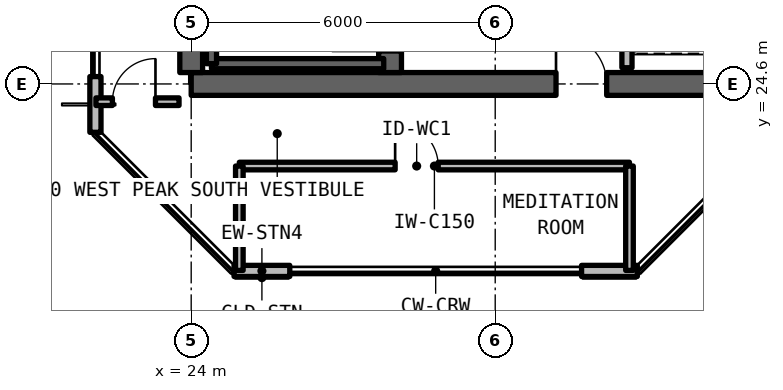
"""IFC4 building model, lengths in metres.
Left out: names, types, materials, properties, quantities, classifications, styles, units other than length and angle.
Written with IfcOpenShell. Run it as: python <this file> out.ifc"""

import sys

from ifc_helpers import new_model, si_unit, direction, frame, frame_2d, origin, place, context, subcontext, project, spatial, rectangle, extrude, element, fill, save


model = new_model("IFC4")
c1 = context("Model", 3, precision=1e-05, world=origin(), true_north=direction((0.0, 1.0)))
c2 = subcontext(c1, "Body", "Model", "MODEL_VIEW")
j1 = project(units=[si_unit("LENGTHUNIT", "METRE"), si_unit("PLANEANGLEUNIT", "RADIAN")], contexts=[c1])
p1 = place(None, origin())
s1 = spatial("IfcSite", under=j1, at=p1, CompositionType="ELEMENT")
p2 = place(p1, origin())
s2 = spatial("IfcBuilding", under=s1, at=p2, CompositionType="ELEMENT")
p3 = place(p2, frame((0.0, 0.0, 249.81)))
s3 = spatial("IfcBuildingStorey", under=s2, at=p3, CompositionType="ELEMENT", Elevation=249.81)
p4 = place(p3, frame((24.0, 24.6, 0.0), z_axis=(0.0, 0.0, 1.0), x_axis=(1.0, 0.0, 0.0)))
e1 = element("IfcWall", 1, at=p4, inside=s3, PredefinedType="SHEAR", context=c2, shape_type="SweptSolid", body=[
    extrude(rectangle(XDim=12.0, YDim=0.45, at=frame_2d((6.0, 0.0))), origin(), (0.0, 0.0, 1.0), 3.63),
])
p5 = place(p4, frame((7.2, 0.0, 0.0)))
e2 = element("IfcOpeningElement", 2, at=p5, cuts=e1, PredefinedType="OPENING", context=c2, shape_type="SweptSolid", body=[
    extrude(rectangle(XDim=1.0, YDim=2.15, at=frame_2d((0.5, 1.075))), frame((0.0, 0.235, 0.0), z_axis=(0.0, -1.0, 0.0), x_axis=(1.0, 0.0, 0.0)), (0.0, 0.0, 1.0), 0.47),
])
p6 = place(p3, frame((24.0, 24.825, 0.0), z_axis=(0.0, 0.0, 1.0), x_axis=(0.0, 1.0, 0.0)))
e3 = element("IfcWall", 3, at=p6, inside=s3, PredefinedType="SHEAR", context=c2, shape_type="SweptSolid", body=[
    extrude(rectangle(XDim=17.55, YDim=0.45, at=frame_2d((8.775, 0.0))), origin(), (0.0, 0.0, 1.0), 3.63),
])
p7 = place(p3, frame((27.925, 24.825, 0.0), z_axis=(0.0, 0.0, 1.0), x_axis=(0.0, 1.0, 0.0)))
e4 = element("IfcWall", 4, at=p7, inside=s3, PredefinedType="SHEAR", context=c2, shape_type="SweptSolid", body=[
    extrude(rectangle(XDim=17.55, YDim=0.45, at=frame_2d((8.775, 0.0))), origin(), (0.0, 0.0, 1.0), 3.63),
])
p8 = place(p7, frame((0.425, 0.0, 0.0)))
e5 = element("IfcOpeningElement", 5, at=p8, cuts=e4, PredefinedType="OPENING", context=c2, shape_type="SweptSolid", body=[
    extrude(rectangle(XDim=1.15, YDim=2.15, at=frame_2d((0.575, 1.075))), frame((0.0, 0.235, 0.0), z_axis=(0.0, -1.0, 0.0), x_axis=(1.0, 0.0, 0.0)), (0.0, 0.0, 1.0), 0.47),
])
p9 = place(p7, frame((9.625, 0.0, 0.0)))
e6 = element("IfcOpeningElement", 6, at=p9, cuts=e4, PredefinedType="OPENING", context=c2, shape_type="SweptSolid", body=[
    extrude(rectangle(XDim=1.15, YDim=2.15, at=frame_2d((0.575, 1.075))), frame((0.0, 0.235, 0.0), z_axis=(0.0, -1.0, 0.0), x_axis=(1.0, 0.0, 0.0)), (0.0, 0.0, 1.0), 0.47),
])
p10 = place(p3, frame((24.846, 20.91, 0.0), z_axis=(0.0, 0.0, 1.0), x_axis=(1.0, 0.0, 0.0)))
e7 = element("IfcWall", 7, at=p10, inside=s3, PredefinedType="SOLIDWALL", context=c2, shape_type="SweptSolid", body=[
    extrude(rectangle(XDim=1.1, YDim=0.22, at=frame_2d((0.55, 0.0))), origin(), (0.0, 0.0, 1.0), 3.41),
])
for number, where, z_axis, x_axis in (
    (8, (31.704, 20.91, 0.0), (0.0, 0.0, 1.0), (1.0, 0.0, 0.0)),
    (9, (22.11, 24.746, 0.0), (0.0, 0.0, 1.0), (0.0, -1.0, 0.0)),
):
    element("IfcWall", number, at=place(p3, frame(where, z_axis=z_axis, x_axis=x_axis)), inside=s3, PredefinedType="SOLIDWALL", context=c2, shape_type="SweptSolid", body=[
        extrude(rectangle(XDim=1.1, YDim=0.22, at=frame_2d((0.55, 0.0))), origin(), (0.0, 0.0, 1.0), 3.41),
    ])
p11 = place(p3, frame((32.6, 24.92, 0.0), z_axis=(0.0, 0.0, 1.0), x_axis=(0.0, 1.0, 0.0)))
e10 = element("IfcWall", 10, at=p11, inside=s3, PredefinedType="SOLIDWALL", context=c2, shape_type="SweptSolid", body=[
    extrude(rectangle(XDim=3.58, YDim=0.2, at=frame_2d((1.79, 0.0))), origin(), (0.0, 0.0, 1.0), 2.63),
])
p12 = place(p11, frame((1.3, 0.0, 0.0)))
e11 = element("IfcOpeningElement", 11, at=p12, cuts=e10, PredefinedType="OPENING", context=c2, shape_type="SweptSolid", body=[
    extrude(rectangle(XDim=1.1, YDim=2.2, at=frame_2d((0.55, 1.1))), frame((0.0, 0.11, 0.0), z_axis=(0.0, -1.0, 0.0), x_axis=(1.0, 0.0, 0.0)), (0.0, 0.0, 1.0), 0.22),
])
p13 = place(p3, frame((24.95, 22.98, 0.0), z_axis=(0.0, 0.0, 1.0), x_axis=(1.0, 0.0, 0.0)))
e12 = element("IfcWall", 12, at=p13, inside=s3, PredefinedType="SOLIDWALL", context=c2, shape_type="SweptSolid", body=[
    extrude(rectangle(XDim=7.7, YDim=0.15, at=frame_2d((3.85, 0.0))), origin(), (0.0, 0.0, 1.0), 2.63),
])
p14 = place(p13, frame((3.075, 0.0, 0.0)))
e13 = element("IfcOpeningElement", 13, at=p14, cuts=e12, PredefinedType="OPENING", context=c2, shape_type="SweptSolid", body=[
    extrude(rectangle(XDim=0.85, YDim=2.1, at=frame_2d((0.425, 1.05))), frame((0.0, 0.085, 0.0), z_axis=(0.0, -1.0, 0.0), x_axis=(1.0, 0.0, 0.0)), (0.0, 0.0, 1.0), 0.17),
])
for number, where, z_axis, x_axis in (
    (14, (24.95, 20.92, 0.0), (0.0, 0.0, 1.0), (0.0, 1.0, 0.0)),
    (15, (32.65, 20.92, 0.0), (0.0, 0.0, 1.0), (0.0, 1.0, 0.0)),
):
    element("IfcWall", number, at=place(p3, frame(where, z_axis=z_axis, x_axis=x_axis)), inside=s3, PredefinedType="SOLIDWALL", context=c2, shape_type="SweptSolid", body=[
        extrude(rectangle(XDim=2.06, YDim=0.15, at=frame_2d((1.03, 0.0))), origin(), (0.0, 0.0, 1.0), 2.63),
    ])
p15 = place(p3, frame((22.12, 24.25, 0.0), z_axis=(0.0, 0.0, 1.0), x_axis=(1.0, 0.0, 0.0)))
e16 = element("IfcWall", 16, at=p15, inside=s3, PredefinedType="SOLIDWALL", context=c2, shape_type="SweptSolid", body=[
    extrude(rectangle(XDim=1.64, YDim=0.15, at=frame_2d((0.82, 0.0))), origin(), (0.0, 0.0, 1.0), 2.63),
])
p16 = place(p15, frame((0.325, 0.0, 0.0)))
e17 = element("IfcOpeningElement", 17, at=p16, cuts=e16, PredefinedType="OPENING", context=c2, shape_type="SweptSolid", body=[
    extrude(rectangle(XDim=0.85, YDim=2.1, at=frame_2d((0.425, 1.05))), frame((0.0, 0.085, 0.0), z_axis=(0.0, -1.0, 0.0), x_axis=(1.0, 0.0, 0.0)), (0.0, 0.0, 1.0), 0.17),
])
p17 = place(p3, frame((24.4, 25.0, 0.0), z_axis=(0.0, 0.0, 1.0), x_axis=(1.0, 0.0, 0.0)))
e18 = element("IfcWall", 18, at=p17, inside=s3, PredefinedType="SOLIDWALL", context=c2, shape_type="SweptSolid", body=[
    extrude(rectangle(XDim=3.4, YDim=0.2, at=frame_2d((1.7, 0.0))), origin(), (0.0, 0.0, 1.0), 3.63),
])
p18 = place(p3, frame((24.4, 33.0, 0.0), z_axis=(0.0, 0.0, 1.0), x_axis=(0.0, -1.0, 0.0)))
e19 = element("IfcWall", 19, at=p18, inside=s3, PredefinedType="SOLIDWALL", context=c2, shape_type="SweptSolid", body=[
    extrude(rectangle(XDim=8.0, YDim=0.2, at=frame_2d((4.0, 0.0))), origin(), (0.0, 0.0, 1.0), 3.63),
])
p19 = place(p14, origin())
e20 = element("IfcDoor", 20, at=p19, inside=s3, OperationType="SINGLE_SWING_LEFT", PredefinedType="DOOR", context=c2, shape_type="SweptSolid", body=[
    extrude(rectangle(XDim=0.85, YDim=2.1, at=frame_2d((0.425, 1.05))), frame((0.0, 0.025, 0.0), z_axis=(0.0, -1.0, 0.0), x_axis=(1.0, 0.0, 0.0)), (0.0, 0.0, 1.0), 0.05),
])
fill(e13, e20)
p20 = place(p16, origin())
e21 = element("IfcDoor", 21, at=p20, inside=s3, OperationType="SINGLE_SWING_RIGHT", PredefinedType="DOOR", context=c2, shape_type="SweptSolid", body=[
    extrude(rectangle(XDim=0.85, YDim=2.1, at=frame_2d((0.425, 1.05))), frame((0.0, 0.025, 0.0), z_axis=(0.0, -1.0, 0.0), x_axis=(1.0, 0.0, 0.0)), (0.0, 0.0, 1.0), 0.05),
])
fill(e17, e21)
p21 = place(p5, origin())
e22 = element("IfcDoor", 22, at=p21, inside=s3, OperationType="SINGLE_SWING_LEFT", PredefinedType="DOOR", context=c2, shape_type="SweptSolid", body=[
    extrude(rectangle(XDim=1.0, YDim=2.15, at=frame_2d((0.5, 1.075))), frame((0.0, 0.025, 0.0), z_axis=(0.0, -1.0, 0.0), x_axis=(1.0, 0.0, 0.0)), (0.0, 0.0, 1.0), 0.05),
])
fill(e2, e22)
save(model, sys.argv[1])
